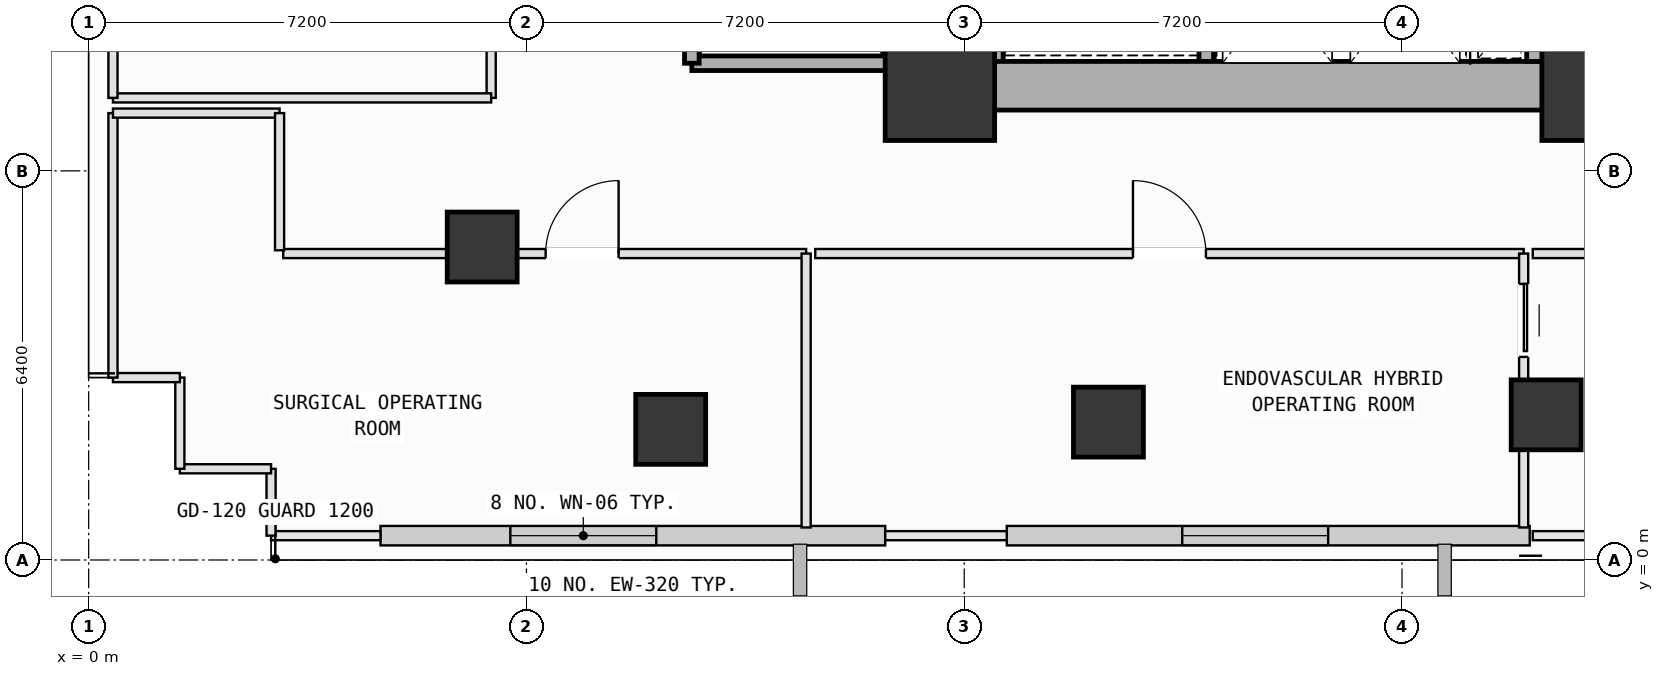
"""IFC4 building model, lengths in metres.
Left out: names, types, materials, properties, quantities, classifications, styles, units other than length and angle.
Written with IfcOpenShell. Run it as: python <this file> out.ifc"""

import sys

from ifc_helpers import new_model, si_unit, direction, frame, frame_2d, origin, origin_2d, place, context, subcontext, project, spatial, rectangle, extrude, element, fill, save


model = new_model("IFC4")
c1 = context("Model", 3, precision=1e-05, world=origin(), true_north=direction((0.0, 1.0)))
c2 = subcontext(c1, "Body", "Model", "MODEL_VIEW")
j1 = project(units=[si_unit("LENGTHUNIT", "METRE"), si_unit("PLANEANGLEUNIT", "RADIAN")], contexts=[c1])
p1 = place(None, origin())
s1 = spatial("IfcSite", under=j1, at=p1, CompositionType="ELEMENT")
p2 = place(p1, origin())
s2 = spatial("IfcBuilding", under=s1, at=p2, CompositionType="ELEMENT")
p3 = place(p2, frame((0.0, 0.0, 21.6)))
s3 = spatial("IfcBuildingStorey", under=s2, at=p3, CompositionType="ELEMENT", Elevation=21.6)
for number, where, z_axis, x_axis in (
    (1, (14.0, 7.8, 0.0), (0.0, 0.0, 1.0), (1.0, 0.0, 0.0)),
    (2, (24.8, 7.8, 0.0), (0.0, 0.0, 1.0), (1.0, 0.0, 0.0)),
):
    element("IfcColumn", number, at=place(p3, frame(where, z_axis=z_axis, x_axis=x_axis)), inside=s3, PredefinedType="COLUMN", context=c2, shape_type="SweptSolid", body=[
        extrude(rectangle(XDim=1.8, YDim=1.8, at=origin_2d()), origin(), (0.0, 0.0, 1.0), 5.4),
    ])
for number, where, z_axis, x_axis in (
    (3, (9.572, 2.148, 0.0), (0.0, 0.0, 1.0), (1.0, 0.0, 0.0)),
    (4, (16.771, 2.268, 0.0), (0.0, 0.0, 1.0), (1.0, 0.0, 0.0)),
    (5, (23.97, 2.387, 0.0), (0.0, 0.0, 1.0), (1.0, 0.0, 0.0)),
    (6, (6.472, 5.147, 0.0), (0.0, 0.0, 1.0), (1.0, 0.0, 0.0)),
):
    element("IfcColumn", number, at=place(p3, frame(where, z_axis=z_axis, x_axis=x_axis)), inside=s3, PredefinedType="COLUMN", context=c2, shape_type="SweptSolid", body=[
        extrude(rectangle(XDim=1.15, YDim=1.15, at=origin_2d()), origin(), (0.0, 0.0, 1.0), 5.4),
    ])
p4 = place(p3, frame((13.1, 0.4, 0.0), z_axis=(0.0, 0.0, 1.0), x_axis=(-1.0, 0.0, 0.0)))
e7 = element("IfcWall", 7, at=p4, inside=s3, PredefinedType="SOLIDWALL", context=c2, shape_type="SweptSolid", body=[
    extrude(rectangle(XDim=8.3, YDim=0.32, at=frame_2d((4.15, 0.0))), origin(), (0.0, 0.0, 1.0), 4.18),
])
p5 = place(p4, frame((3.765, 0.0, 0.8)))
e8 = element("IfcOpeningElement", 8, at=p5, cuts=e7, PredefinedType="OPENING", context=c2, shape_type="SweptSolid", body=[
    extrude(rectangle(XDim=2.4, YDim=2.2, at=frame_2d((1.2, 1.1))), frame((0.0, 0.17, 0.0), z_axis=(0.0, -1.0, 0.0), x_axis=(1.0, 0.0, 0.0)), (0.0, 0.0, 1.0), 0.34),
])
p6 = place(p3, frame((23.7, 0.4, 0.0), z_axis=(0.0, 0.0, 1.0), x_axis=(-1.0, 0.0, 0.0)))
e9 = element("IfcWall", 9, at=p6, inside=s3, PredefinedType="SOLIDWALL", context=c2, shape_type="SweptSolid", body=[
    extrude(rectangle(XDim=8.6, YDim=0.32, at=frame_2d((4.3, 0.0))), origin(), (0.0, 0.0, 1.0), 4.18),
])
p7 = place(p6, frame((3.315, 0.0, 0.8)))
e10 = element("IfcOpeningElement", 10, at=p7, cuts=e9, PredefinedType="OPENING", context=c2, shape_type="SweptSolid", body=[
    extrude(rectangle(XDim=2.4, YDim=2.2, at=frame_2d((1.2, 1.1))), frame((0.0, 0.17, 0.0), z_axis=(0.0, -1.0, 0.0), x_axis=(1.0, 0.0, 0.0)), (0.0, 0.0, 1.0), 0.34),
])
for number, where, z_axis, x_axis in (
    (11, (18.38, 15.12, 0.0), (0.0, 0.0, 1.0), (0.0, -1.0, 0.0)),
    (12, (14.92, 8.2, 0.0), (0.0, 0.0, 1.0), (0.0, 1.0, 0.0)),
):
    element("IfcWall", number, at=place(p3, frame(where, z_axis=z_axis, x_axis=x_axis)), inside=s3, PredefinedType="SOLIDWALL", context=c2, shape_type="SweptSolid", body=[
        extrude(rectangle(XDim=6.92, YDim=0.24, at=frame_2d((3.46, 0.0))), origin(), (0.0, 0.0, 1.0), 5.1),
    ])
p8 = place(p3, frame((13.18, 15.22, 0.0), z_axis=(0.0, 0.0, 1.0), x_axis=(0.0, -1.0, 0.0)))
e13 = element("IfcWall", 13, at=p8, inside=s3, PredefinedType="SOLIDWALL", context=c2, shape_type="SweptSolid", body=[
    extrude(rectangle(XDim=7.05, YDim=0.24, at=frame_2d((3.525, 0.0))), origin(), (0.0, 0.0, 1.0), 5.1),
])
p9 = place(p3, frame((13.18, 8.17, 0.0), z_axis=(0.0, 0.0, 1.0), x_axis=(-1.0, 0.0, 0.0)))
e14 = element("IfcWall", 14, at=p9, inside=s3, PredefinedType="SOLIDWALL", context=c2, shape_type="SweptSolid", body=[
    extrude(rectangle(XDim=3.26, YDim=0.24, at=frame_2d((1.63, 0.0))), origin(), (0.0, 0.0, 1.0), 5.1),
])
p10 = place(p3, frame((9.92, 8.17, 0.0), z_axis=(0.0, 0.0, 1.0), x_axis=(0.0, 1.0, 0.0)))
e15 = element("IfcWall", 15, at=p10, inside=s3, PredefinedType="SOLIDWALL", context=c2, shape_type="SweptSolid", body=[
    extrude(rectangle(XDim=7.05, YDim=0.24, at=frame_2d((3.525, 0.0))), origin(), (0.0, 0.0, 1.0), 5.1),
])
p11 = place(p3, frame((14.0, 7.8, 0.0), z_axis=(0.0, 0.0, 1.0), x_axis=(1.0, 0.0, 0.0)))
e16 = element("IfcWall", 16, at=p11, inside=s3, PredefinedType="SHEAR", context=c2, shape_type="SweptSolid", body=[
    extrude(rectangle(XDim=10.8, YDim=0.8, at=frame_2d((5.4, 0.0))), origin(), (0.0, 0.0, 1.0), 5.1),
])
p12 = place(p3, frame((14.0, 16.8, 0.0), z_axis=(0.0, 0.0, 1.0), x_axis=(0.0, -1.0, 0.0)))
e17 = element("IfcWall", 17, at=p12, inside=s3, PredefinedType="SHEAR", context=c2, shape_type="SweptSolid", body=[
    extrude(rectangle(XDim=9.0, YDim=0.8, at=frame_2d((4.5, 0.0))), origin(), (0.0, 0.0, 1.0), 5.1),
])
p13 = place(p3, frame((23.8, 8.2, 0.0), z_axis=(0.0, 0.0, 1.0), x_axis=(0.0, 1.0, 0.0)))
e18 = element("IfcWall", 18, at=p13, inside=s3, PredefinedType="SOLIDWALL", context=c2, shape_type="SweptSolid", body=[
    extrude(rectangle(XDim=2.48, YDim=0.3, at=frame_2d((1.24, 0.0))), origin(), (0.0, 0.0, 1.0), 5.1),
])
p14 = place(p3, frame((6.62, 20.15, 0.0), z_axis=(0.0, 0.0, 1.0), x_axis=(0.0, -1.0, 0.0)))
e19 = element("IfcWall", 19, at=p14, inside=s3, PredefinedType="PARTITIONING", context=c2, shape_type="SweptSolid", body=[
    extrude(rectangle(XDim=12.55, YDim=0.15, at=frame_2d((6.275, 0.0))), origin(), (0.0, 0.0, 1.0), 2.685),
])
p15 = place(p14, frame((5.675, 0.0, 0.0)))
e20 = element("IfcOpeningElement", 20, at=p15, cuts=e19, PredefinedType="OPENING", context=c2, shape_type="SweptSolid", body=[
    extrude(rectangle(XDim=1.2, YDim=2.15, at=frame_2d((0.6, 1.075))), frame((0.0, 0.085, 0.0), z_axis=(0.0, -1.0, 0.0), x_axis=(1.0, 0.0, 0.0)), (0.0, 0.0, 1.0), 0.17),
])
p16 = place(p3, frame((6.62, 7.6, 0.0), z_axis=(0.0, 0.0, 1.0), x_axis=(-1.0, 0.0, 0.0)))
e21 = element("IfcWall", 21, at=p16, inside=s3, PredefinedType="PARTITIONING", context=c2, shape_type="SweptSolid", body=[
    extrude(rectangle(XDim=6.22, YDim=0.15, at=frame_2d((3.11, 0.0))), origin(), (0.0, 0.0, 1.0), 5.1),
])
p17 = place(p3, frame((0.4, 7.6, 0.0), z_axis=(0.0, 0.0, 1.0), x_axis=(0.0, 1.0, 0.0)))
e22 = element("IfcWall", 22, at=p17, inside=s3, PredefinedType="PARTITIONING", context=c2, shape_type="SweptSolid", body=[
    extrude(rectangle(XDim=6.0, YDim=0.15, at=frame_2d((3.0, 0.0))), origin(), (0.0, 0.0, 1.0), 5.1),
])
p18 = place(p3, frame((3.2, 5.04, 0.0), z_axis=(0.0, 0.0, 1.0), x_axis=(1.0, 0.0, 0.0)))
e23 = element("IfcWall", 23, at=p18, inside=s3, PredefinedType="PARTITIONING", context=c2, shape_type="SweptSolid", body=[
    extrude(rectangle(XDim=8.6, YDim=0.15, at=frame_2d((4.3, 0.0))), origin(), (0.0, 0.0, 1.0), 2.685),
])
p19 = place(p18, frame((4.316, 0.0, 0.0)))
e24 = element("IfcOpeningElement", 24, at=p19, cuts=e23, PredefinedType="OPENING", context=c2, shape_type="SweptSolid", body=[
    extrude(rectangle(XDim=1.2, YDim=2.15, at=frame_2d((0.6, 1.075))), frame((0.0, 0.085, 0.0), z_axis=(0.0, -1.0, 0.0), x_axis=(1.0, 0.0, 0.0)), (0.0, 0.0, 1.0), 0.17),
])
p20 = place(p3, frame((11.8, 5.04, 0.0), z_axis=(0.0, 0.0, 1.0), x_axis=(0.0, -1.0, 0.0)))
e25 = element("IfcWall", 25, at=p20, inside=s3, PredefinedType="PARTITIONING", context=c2, shape_type="SweptSolid", body=[
    extrude(rectangle(XDim=4.505, YDim=0.15, at=frame_2d((2.252, 0.0))), origin(), (0.0, 0.0, 1.0), 5.1),
])
p21 = place(p3, frame((4.8, 0.4, 0.0), z_axis=(0.0, 0.0, 1.0), x_axis=(-1.0, 0.0, 0.0)))
e26 = element("IfcWall", 26, at=p21, inside=s3, PredefinedType="PARTITIONING", context=c2, shape_type="SweptSolid", body=[
    extrude(rectangle(XDim=1.8, YDim=0.15, at=frame_2d((0.9, 0.0))), origin(), (0.0, 0.0, 1.0), 5.1),
])
p22 = place(p3, frame((3.0, 0.4, 0.0), z_axis=(0.0, 0.0, 1.0), x_axis=(0.0, 1.0, 0.0)))
e27 = element("IfcWall", 27, at=p22, inside=s3, PredefinedType="PARTITIONING", context=c2, shape_type="SweptSolid", body=[
    extrude(rectangle(XDim=1.1, YDim=0.15, at=frame_2d((0.55, 0.0))), origin(), (0.0, 0.0, 1.0), 5.1),
])
for number, where, z_axis, x_axis in (
    (28, (3.0, 1.5, 0.0), (0.0, 0.0, 1.0), (-1.0, 0.0, 0.0)),
    (29, (1.5, 1.5, 0.0), (0.0, 0.0, 1.0), (0.0, 1.0, 0.0)),
):
    element("IfcWall", number, at=place(p3, frame(where, z_axis=z_axis, x_axis=x_axis)), inside=s3, PredefinedType="PARTITIONING", context=c2, shape_type="SweptSolid", body=[
        extrude(rectangle(XDim=1.5, YDim=0.15, at=frame_2d((0.75, 0.0))), origin(), (0.0, 0.0, 1.0), 5.1),
    ])
p23 = place(p3, frame((1.5, 3.0, 0.0), z_axis=(0.0, 0.0, 1.0), x_axis=(-1.0, 0.0, 0.0)))
e30 = element("IfcWall", 30, at=p23, inside=s3, PredefinedType="PARTITIONING", context=c2, shape_type="SweptSolid", body=[
    extrude(rectangle(XDim=1.1, YDim=0.15, at=frame_2d((0.55, 0.0))), origin(), (0.0, 0.0, 1.0), 5.1),
])
p24 = place(p3, frame((0.4, 3.0, 0.0), z_axis=(0.0, 0.0, 1.0), x_axis=(0.0, 1.0, 0.0)))
e31 = element("IfcWall", 31, at=p24, inside=s3, PredefinedType="PARTITIONING", context=c2, shape_type="SweptSolid", body=[
    extrude(rectangle(XDim=4.35, YDim=0.15, at=frame_2d((2.175, 0.0))), origin(), (0.0, 0.0, 1.0), 5.1),
])
p25 = place(p3, frame((0.4, 7.35, 0.0), z_axis=(0.0, 0.0, 1.0), x_axis=(1.0, 0.0, 0.0)))
e32 = element("IfcWall", 32, at=p25, inside=s3, PredefinedType="PARTITIONING", context=c2, shape_type="SweptSolid", body=[
    extrude(rectangle(XDim=2.74, YDim=0.15, at=frame_2d((1.37, 0.0))), origin(), (0.0, 0.0, 1.0), 5.1),
])
p26 = place(p3, frame((3.14, 7.35, 0.0), z_axis=(0.0, 0.0, 1.0), x_axis=(0.0, -1.0, 0.0)))
e33 = element("IfcWall", 33, at=p26, inside=s3, PredefinedType="PARTITIONING", context=c2, shape_type="SweptSolid", body=[
    extrude(rectangle(XDim=2.256, YDim=0.15, at=frame_2d((1.128, 0.0))), origin(), (0.0, 0.0, 1.0), 5.1),
])
p27 = place(p3, frame((15.1, 0.4, 0.0), z_axis=(0.0, 0.0, 1.0), x_axis=(-1.0, 0.0, 0.0)))
e34 = element("IfcWall", 34, at=p27, inside=s3, PredefinedType="PARTITIONING", context=c2, shape_type="SweptSolid", body=[
    extrude(rectangle(XDim=2.0, YDim=0.15, at=frame_2d((1.0, 0.0))), origin(), (0.0, 0.0, 1.0), 5.1),
])
p28 = place(p3, frame((11.95, 5.04, 0.0), z_axis=(0.0, 0.0, 1.0), x_axis=(1.0, 0.0, 0.0)))
e35 = element("IfcWall", 35, at=p28, inside=s3, PredefinedType="PARTITIONING", context=c2, shape_type="SweptSolid", body=[
    extrude(rectangle(XDim=11.65, YDim=0.15, at=frame_2d((5.825, 0.0))), origin(), (0.0, 0.0, 1.0), 5.1),
])
p29 = place(p28, frame((5.225, 0.0, 0.0)))
e36 = element("IfcOpeningElement", 36, at=p29, cuts=e35, PredefinedType="OPENING", context=c2, shape_type="SweptSolid", body=[
    extrude(rectangle(XDim=1.2, YDim=2.15, at=frame_2d((0.6, 1.075))), frame((0.0, 0.085, 0.0), z_axis=(0.0, -1.0, 0.0), x_axis=(1.0, 0.0, 0.0)), (0.0, 0.0, 1.0), 0.17),
])
p30 = place(p3, frame((23.6, 5.04, 0.0), z_axis=(0.0, 0.0, 1.0), x_axis=(0.0, -1.0, 0.0)))
e37 = element("IfcWall", 37, at=p30, inside=s3, PredefinedType="PARTITIONING", context=c2, shape_type="SweptSolid", body=[
    extrude(rectangle(XDim=4.505, YDim=0.15, at=frame_2d((2.252, 0.0))), origin(), (0.0, 0.0, 1.0), 2.685),
])
p31 = place(p30, frame((0.5, 0.0, 0.0)))
e38 = element("IfcOpeningElement", 38, at=p31, cuts=e37, PredefinedType="OPENING", context=c2, shape_type="SweptSolid", body=[
    extrude(rectangle(XDim=1.2, YDim=2.15, at=frame_2d((0.6, 1.075))), frame((0.0, 0.085, 0.0), z_axis=(0.0, -1.0, 0.0), x_axis=(1.0, 0.0, 0.0)), (0.0, 0.0, 1.0), 0.17),
])
p32 = place(p3, frame((25.9, 0.4, 0.0), z_axis=(0.0, 0.0, 1.0), x_axis=(-1.0, 0.0, 0.0)))
e39 = element("IfcWall", 39, at=p32, inside=s3, PredefinedType="PARTITIONING", context=c2, shape_type="SweptSolid", body=[
    extrude(rectangle(XDim=2.15, YDim=0.15, at=frame_2d((1.075, 0.0))), origin(), (0.0, 0.0, 1.0), 5.1),
])
p33 = place(p3, frame((23.75, 5.04, 0.0), z_axis=(0.0, 0.0, 1.0), x_axis=(1.0, 0.0, 0.0)))
e40 = element("IfcWall", 40, at=p33, inside=s3, PredefinedType="PARTITIONING", context=c2, shape_type="SweptSolid", body=[
    extrude(rectangle(XDim=12.05, YDim=0.15, at=frame_2d((6.025, 0.0))), origin(), (0.0, 0.0, 1.0), 5.1),
])
p34 = place(p5, origin())
e41 = element("IfcWindow", 41, at=p34, inside=s3, PartitioningType="SINGLE_PANEL", PredefinedType="WINDOW", context=c2, shape_type="SweptSolid", body=[
    extrude(rectangle(XDim=2.4, YDim=2.2, at=frame_2d((1.2, 1.1))), frame((0.0, 0.03, 0.0), z_axis=(0.0, -1.0, 0.0), x_axis=(1.0, 0.0, 0.0)), (0.0, 0.0, 1.0), 0.06),
])
fill(e8, e41)
p35 = place(p7, origin())
e42 = element("IfcWindow", 42, at=p35, inside=s3, PartitioningType="SINGLE_PANEL", PredefinedType="WINDOW", context=c2, shape_type="SweptSolid", body=[
    extrude(rectangle(XDim=2.4, YDim=2.2, at=frame_2d((1.2, 1.1))), frame((0.0, 0.03, 0.0), z_axis=(0.0, -1.0, 0.0), x_axis=(1.0, 0.0, 0.0)), (0.0, 0.0, 1.0), 0.06),
])
fill(e10, e42)
p36 = place(p19, origin())
e43 = element("IfcDoor", 43, at=p36, inside=s3, OperationType="SINGLE_SWING_RIGHT", PredefinedType="DOOR", context=c2, shape_type="SweptSolid", body=[
    extrude(rectangle(XDim=1.2, YDim=2.15, at=frame_2d((0.6, 1.075))), frame((0.0, 0.025, 0.0), z_axis=(0.0, -1.0, 0.0), x_axis=(1.0, 0.0, 0.0)), (0.0, 0.0, 1.0), 0.05),
])
fill(e24, e43)
p37 = place(p29, origin())
e44 = element("IfcDoor", 44, at=p37, inside=s3, OperationType="SINGLE_SWING_LEFT", PredefinedType="DOOR", context=c2, shape_type="SweptSolid", body=[
    extrude(rectangle(XDim=1.2, YDim=2.15, at=frame_2d((0.6, 1.075))), frame((0.0, 0.025, 0.0), z_axis=(0.0, -1.0, 0.0), x_axis=(1.0, 0.0, 0.0)), (0.0, 0.0, 1.0), 0.05),
])
fill(e36, e44)
p38 = place(p31, origin())
e45 = element("IfcDoor", 45, at=p38, inside=s3, OperationType="SLIDING_TO_LEFT", PredefinedType="DOOR", context=c2, shape_type="SweptSolid", body=[
    extrude(rectangle(XDim=1.2, YDim=2.15, at=frame_2d((0.6, 1.075))), frame((0.0, 0.025, 0.0), z_axis=(0.0, -1.0, 0.0), x_axis=(1.0, 0.0, 0.0)), (0.0, 0.0, 1.0), 0.05),
])
fill(e38, e45)
save(model, sys.argv[1])
